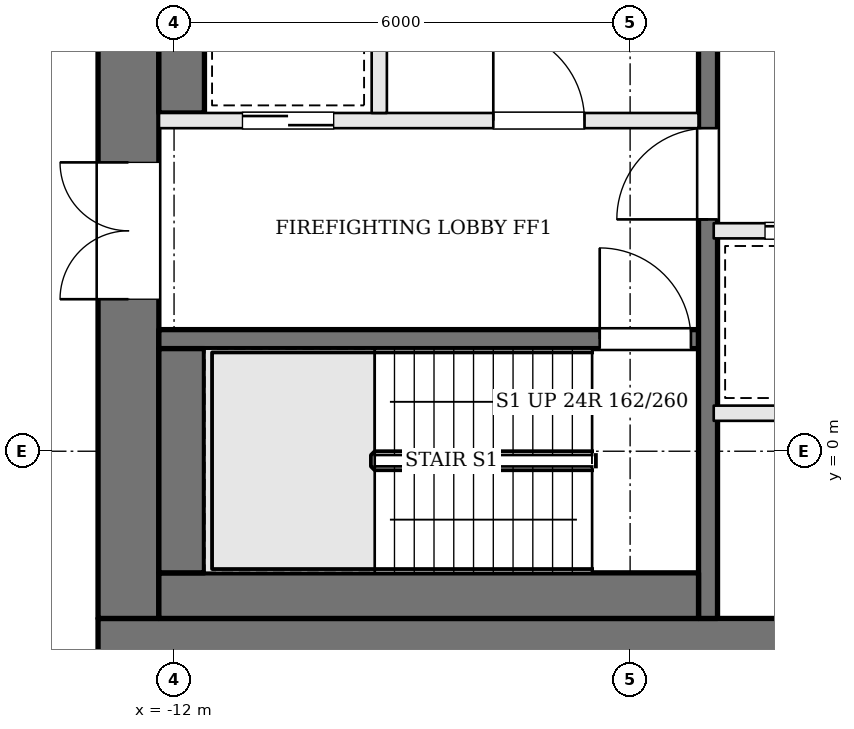
"""IFC4 building model, lengths in metres.
Left out: names, types, materials, properties, quantities, classifications, styles, units other than length and angle.
Written with IfcOpenShell. Run it as: python <this file> out.ifc"""

import sys

from ifc_helpers import new_model, si_unit, direction, frame, frame_2d, origin, place, context, subcontext, project, spatial, rectangle, extrude, element, fill, save


model = new_model("IFC4")
c1 = context("Model", 3, precision=1e-05, world=origin(), true_north=direction((0.0, 1.0)))
c2 = subcontext(c1, "Body", "Model", "MODEL_VIEW")
j1 = project(units=[si_unit("LENGTHUNIT", "METRE"), si_unit("PLANEANGLEUNIT", "RADIAN")], contexts=[c1])
p1 = place(None, origin())
s1 = spatial("IfcSite", under=j1, at=p1, CompositionType="ELEMENT")
p2 = place(p1, origin())
s2 = spatial("IfcBuilding", under=s1, at=p2, CompositionType="ELEMENT")
p3 = place(p2, frame((0.0, 0.0, 268.8)))
s3 = spatial("IfcBuildingStorey", under=s2, at=p3, CompositionType="ELEMENT", Elevation=268.8)
p4 = place(p3, frame((-13.0, -2.6, 0.0), z_axis=(0.0, 0.0, 1.0), x_axis=(1.0, 0.0, 0.0)))
e1 = element("IfcWall", 1, at=p4, inside=s3, PredefinedType="SHEAR", context=c2, shape_type="SweptSolid", body=[
    extrude(rectangle(XDim=26.0, YDim=0.8, at=frame_2d((13.0, 0.0))), origin(), (0.0, 0.0, 1.0), 3.9),
])
p5 = place(p4, frame((9.2, 0.0, 0.0)))
e2 = element("IfcOpeningElement", 2, at=p5, cuts=e1, PredefinedType="OPENING", context=c2, shape_type="SweptSolid", body=[
    extrude(rectangle(XDim=0.9, YDim=2.1, at=frame_2d((0.45, 1.05))), frame((0.0, 0.41, 0.0), z_axis=(0.0, -1.0, 0.0), x_axis=(1.0, 0.0, 0.0)), (0.0, 0.0, 1.0), 0.82),
])
p6 = place(p4, frame((12.3, 0.0, 0.0)))
e3 = element("IfcOpeningElement", 3, at=p6, cuts=e1, PredefinedType="OPENING", context=c2, shape_type="SweptSolid", body=[
    extrude(rectangle(XDim=0.9, YDim=2.1, at=frame_2d((0.45, 1.05))), frame((0.0, 0.41, 0.0), z_axis=(0.0, -1.0, 0.0), x_axis=(1.0, 0.0, 0.0)), (0.0, 0.0, 1.0), 0.82),
])
p7 = place(p4, frame((14.7, 0.0, 0.0)))
e4 = element("IfcOpeningElement", 4, at=p7, cuts=e1, PredefinedType="OPENING", context=c2, shape_type="SweptSolid", body=[
    extrude(rectangle(XDim=1.0, YDim=2.1, at=frame_2d((0.5, 1.05))), frame((0.0, 0.41, 0.0), z_axis=(0.0, -1.0, 0.0), x_axis=(1.0, 0.0, 0.0)), (0.0, 0.0, 1.0), 0.82),
])
p8 = place(p4, frame((16.55, 0.0, 0.0)))
e5 = element("IfcOpeningElement", 5, at=p8, cuts=e1, PredefinedType="OPENING", context=c2, shape_type="SweptSolid", body=[
    extrude(rectangle(XDim=0.9, YDim=2.1, at=frame_2d((0.45, 1.05))), frame((0.0, 0.41, 0.0), z_axis=(0.0, -1.0, 0.0), x_axis=(1.0, 0.0, 0.0)), (0.0, 0.0, 1.0), 0.82),
])
p9 = place(p3, frame((-12.6, -2.2, 0.0), z_axis=(0.0, 0.0, 1.0), x_axis=(0.0, 1.0, 0.0)))
e6 = element("IfcWall", 6, at=p9, inside=s3, PredefinedType="SHEAR", context=c2, shape_type="SweptSolid", body=[
    extrude(rectangle(XDim=13.4, YDim=0.8, at=frame_2d((6.7, 0.0))), origin(), (0.0, 0.0, 1.0), 3.9),
])
p10 = place(p9, frame((4.2, 0.0, 0.0)))
e7 = element("IfcOpeningElement", 7, at=p10, cuts=e6, PredefinedType="OPENING", context=c2, shape_type="SweptSolid", body=[
    extrude(rectangle(XDim=1.8, YDim=2.1, at=frame_2d((0.9, 1.05))), frame((0.0, 0.41, 0.0), z_axis=(0.0, -1.0, 0.0), x_axis=(1.0, 0.0, 0.0)), (0.0, 0.0, 1.0), 0.82),
])
p11 = place(p3, frame((-12.2, 1.475, 0.0), z_axis=(0.0, 0.0, 1.0), x_axis=(1.0, 0.0, 0.0)))
e8 = element("IfcWall", 8, at=p11, inside=s3, PredefinedType="SOLIDWALL", context=c2, shape_type="SweptSolid", body=[
    extrude(rectangle(XDim=7.1, YDim=0.25, at=frame_2d((3.55, 0.0))), origin(), (0.0, 0.0, 1.0), 3.7),
])
p12 = place(p11, frame((5.8, 0.0, 0.0)))
e9 = element("IfcOpeningElement", 9, at=p12, cuts=e8, PredefinedType="OPENING", context=c2, shape_type="SweptSolid", body=[
    extrude(rectangle(XDim=1.2, YDim=2.1, at=frame_2d((0.6, 1.05))), frame((0.0, 0.135, 0.0), z_axis=(0.0, -1.0, 0.0), x_axis=(1.0, 0.0, 0.0)), (0.0, 0.0, 1.0), 0.27),
])
p13 = place(p3, frame((-12.2, 4.35, 0.0), z_axis=(0.0, 0.0, 1.0), x_axis=(1.0, 0.0, 0.0)))
e10 = element("IfcWall", 10, at=p13, inside=s3, PredefinedType="SOLIDWALL", context=c2, shape_type="SweptSolid", body=[
    extrude(rectangle(XDim=7.1, YDim=0.2, at=frame_2d((3.55, 0.0))), origin(), (0.0, 0.0, 1.0), 3.7),
])
p14 = place(p13, frame((4.4, 0.0, 0.0)))
e11 = element("IfcOpeningElement", 11, at=p14, cuts=e10, PredefinedType="OPENING", context=c2, shape_type="SweptSolid", body=[
    extrude(rectangle(XDim=1.2, YDim=2.1, at=frame_2d((0.6, 1.05))), frame((0.0, 0.11, 0.0), z_axis=(0.0, -1.0, 0.0), x_axis=(1.0, 0.0, 0.0)), (0.0, 0.0, 1.0), 0.22),
])
p15 = place(p13, frame((1.1, 0.0, 0.0)))
e12 = element("IfcOpeningElement", 12, at=p15, cuts=e10, PredefinedType="OPENING", context=c2, shape_type="SweptSolid", body=[
    extrude(rectangle(XDim=1.2, YDim=2.1, at=frame_2d((0.6, 1.05))), frame((0.0, 0.11, 0.0), z_axis=(0.0, -1.0, 0.0), x_axis=(1.0, 0.0, 0.0)), (0.0, 0.0, 1.0), 0.22),
])
p16 = place(p3, frame((-9.3, 4.45, 0.0), z_axis=(0.0, 0.0, 1.0), x_axis=(0.0, 1.0, 0.0)))
e13 = element("IfcWall", 13, at=p16, inside=s3, PredefinedType="SOLIDWALL", context=c2, shape_type="SweptSolid", body=[
    extrude(rectangle(XDim=3.0, YDim=0.2, at=frame_2d((1.5, 0.0))), origin(), (0.0, 0.0, 1.0), 3.7),
])
p17 = place(p3, frame((-4.975, -2.2, 0.0), z_axis=(0.0, 0.0, 1.0), x_axis=(0.0, 1.0, 0.0)))
e14 = element("IfcWall", 14, at=p17, inside=s3, PredefinedType="SOLIDWALL", context=c2, shape_type="SweptSolid", body=[
    extrude(rectangle(XDim=13.4, YDim=0.25, at=frame_2d((6.7, 0.0))), origin(), (0.0, 0.0, 1.0), 3.7),
])
p18 = place(p17, frame((5.25, 0.0, 0.0)))
e15 = element("IfcOpeningElement", 15, at=p18, cuts=e14, PredefinedType="OPENING", context=c2, shape_type="SweptSolid", body=[
    extrude(rectangle(XDim=1.2, YDim=2.1, at=frame_2d((0.6, 1.05))), frame((0.0, 0.135, 0.0), z_axis=(0.0, -1.0, 0.0), x_axis=(1.0, 0.0, 0.0)), (0.0, 0.0, 1.0), 0.27),
])
p19 = place(p3, frame((-12.2, -1.9, 0.0), z_axis=(0.0, 0.0, 1.0), x_axis=(1.0, 0.0, 0.0)))
e16 = element("IfcWall", 16, at=p19, inside=s3, PredefinedType="SOLIDWALL", context=c2, shape_type="SweptSolid", body=[
    extrude(rectangle(XDim=7.1, YDim=0.6, at=frame_2d((3.55, 0.0))), origin(), (0.0, 0.0, 1.0), 3.7),
])
p20 = place(p3, frame((-11.9, -1.6, 0.0), z_axis=(0.0, 0.0, 1.0), x_axis=(0.0, 1.0, 0.0)))
e17 = element("IfcWall", 17, at=p20, inside=s3, PredefinedType="SOLIDWALL", context=c2, shape_type="SweptSolid", body=[
    extrude(rectangle(XDim=2.95, YDim=0.6, at=frame_2d((1.475, 0.0))), origin(), (0.0, 0.0, 1.0), 3.7),
])
p21 = place(p3, frame((-11.9, 4.45, 0.0), z_axis=(0.0, 0.0, 1.0), x_axis=(0.0, 1.0, 0.0)))
e18 = element("IfcWall", 18, at=p21, inside=s3, PredefinedType="SOLIDWALL", context=c2, shape_type="SweptSolid", body=[
    extrude(rectangle(XDim=3.0, YDim=0.6, at=frame_2d((1.5, 0.0))), origin(), (0.0, 0.0, 1.0), 3.7),
])
p22 = place(p3, frame((-4.9, 0.5, 0.0), z_axis=(0.0, 0.0, 1.0), x_axis=(1.0, 0.0, 0.0)))
e19 = element("IfcWall", 19, at=p22, inside=s3, PredefinedType="SOLIDWALL", context=c2, shape_type="SweptSolid", body=[
    extrude(rectangle(XDim=9.8, YDim=0.2, at=frame_2d((4.9, 0.0))), origin(), (0.0, 0.0, 1.0), 3.7),
])
p23 = place(p3, frame((-4.9, 2.9, 0.0), z_axis=(0.0, 0.0, 1.0), x_axis=(1.0, 0.0, 0.0)))
e20 = element("IfcWall", 20, at=p23, inside=s3, PredefinedType="SOLIDWALL", context=c2, shape_type="SweptSolid", body=[
    extrude(rectangle(XDim=9.8, YDim=0.2, at=frame_2d((4.9, 0.0))), origin(), (0.0, 0.0, 1.0), 3.7),
])
p24 = place(p23, frame((0.675, 0.0, 0.0)))
e21 = element("IfcOpeningElement", 21, at=p24, cuts=e20, PredefinedType="OPENING", context=c2, shape_type="SweptSolid", body=[
    extrude(rectangle(XDim=1.1, YDim=2.1, at=frame_2d((0.55, 1.05))), frame((0.0, 0.11, 0.0), z_axis=(0.0, -1.0, 0.0), x_axis=(1.0, 0.0, 0.0)), (0.0, 0.0, 1.0), 0.22),
])
p25 = place(p23, frame((2.613, 0.0, 0.0)))
e22 = element("IfcOpeningElement", 22, at=p25, cuts=e20, PredefinedType="OPENING", context=c2, shape_type="SweptSolid", body=[
    extrude(rectangle(XDim=0.9, YDim=2.1, at=frame_2d((0.45, 1.05))), frame((0.0, 0.11, 0.0), z_axis=(0.0, -1.0, 0.0), x_axis=(1.0, 0.0, 0.0)), (0.0, 0.0, 1.0), 0.22),
])
p26 = place(p23, frame((4.35, 0.0, 0.0)))
e23 = element("IfcOpeningElement", 23, at=p26, cuts=e20, PredefinedType="OPENING", context=c2, shape_type="SweptSolid", body=[
    extrude(rectangle(XDim=1.1, YDim=2.1, at=frame_2d((0.55, 1.05))), frame((0.0, 0.11, 0.0), z_axis=(0.0, -1.0, 0.0), x_axis=(1.0, 0.0, 0.0)), (0.0, 0.0, 1.0), 0.22),
])
p27 = place(p23, frame((7.463, 0.0, 0.0)))
e24 = element("IfcOpeningElement", 24, at=p27, cuts=e20, PredefinedType="OPENING", context=c2, shape_type="SweptSolid", body=[
    extrude(rectangle(XDim=1.0, YDim=2.1, at=frame_2d((0.5, 1.05))), frame((0.0, 0.11, 0.0), z_axis=(0.0, -1.0, 0.0), x_axis=(1.0, 0.0, 0.0)), (0.0, 0.0, 1.0), 0.22),
])
p28 = place(p10, origin())
e25 = element("IfcDoor", 25, at=p28, inside=s3, OperationType="DOUBLE_DOOR_SINGLE_SWING", PredefinedType="DOOR", context=c2, shape_type="SweptSolid", body=[
    extrude(rectangle(XDim=1.8, YDim=2.1, at=frame_2d((0.9, 1.05))), frame((0.0, 0.025, 0.0), z_axis=(0.0, -1.0, 0.0), x_axis=(1.0, 0.0, 0.0)), (0.0, 0.0, 1.0), 0.05),
])
fill(e7, e25)
p29 = place(p18, origin())
e26 = element("IfcDoor", 26, at=p29, inside=s3, OperationType="SINGLE_SWING_LEFT", PredefinedType="DOOR", context=c2, shape_type="SweptSolid", body=[
    extrude(rectangle(XDim=1.2, YDim=2.1, at=frame_2d((0.6, 1.05))), frame((0.0, 0.025, 0.0), z_axis=(0.0, -1.0, 0.0), x_axis=(1.0, 0.0, 0.0)), (0.0, 0.0, 1.0), 0.05),
])
fill(e15, e26)
p30 = place(p14, origin())
e27 = element("IfcDoor", 27, at=p30, inside=s3, OperationType="SINGLE_SWING_LEFT", PredefinedType="DOOR", context=c2, shape_type="SweptSolid", body=[
    extrude(rectangle(XDim=1.2, YDim=2.1, at=frame_2d((0.6, 1.05))), frame((0.0, 0.025, 0.0), z_axis=(0.0, -1.0, 0.0), x_axis=(1.0, 0.0, 0.0)), (0.0, 0.0, 1.0), 0.05),
])
fill(e11, e27)
p31 = place(p12, origin())
e28 = element("IfcDoor", 28, at=p31, inside=s3, OperationType="SINGLE_SWING_LEFT", PredefinedType="DOOR", context=c2, shape_type="SweptSolid", body=[
    extrude(rectangle(XDim=1.2, YDim=2.1, at=frame_2d((0.6, 1.05))), frame((0.0, 0.025, 0.0), z_axis=(0.0, -1.0, 0.0), x_axis=(1.0, 0.0, 0.0)), (0.0, 0.0, 1.0), 0.05),
])
fill(e9, e28)
p32 = place(p15, origin())
e29 = element("IfcDoor", 29, at=p32, inside=s3, OperationType="SLIDING_TO_RIGHT", PredefinedType="DOOR", context=c2, shape_type="SweptSolid", body=[
    extrude(rectangle(XDim=1.2, YDim=2.1, at=frame_2d((0.6, 1.05))), frame((0.0, 0.025, 0.0), z_axis=(0.0, -1.0, 0.0), x_axis=(1.0, 0.0, 0.0)), (0.0, 0.0, 1.0), 0.05),
])
fill(e12, e29)
p33 = place(p24, origin())
e30 = element("IfcDoor", 30, at=p33, inside=s3, OperationType="SLIDING_TO_RIGHT", PredefinedType="DOOR", context=c2, shape_type="SweptSolid", body=[
    extrude(rectangle(XDim=1.1, YDim=2.1, at=frame_2d((0.55, 1.05))), frame((0.0, 0.025, 0.0), z_axis=(0.0, -1.0, 0.0), x_axis=(1.0, 0.0, 0.0)), (0.0, 0.0, 1.0), 0.05),
])
fill(e21, e30)
save(model, sys.argv[1])
